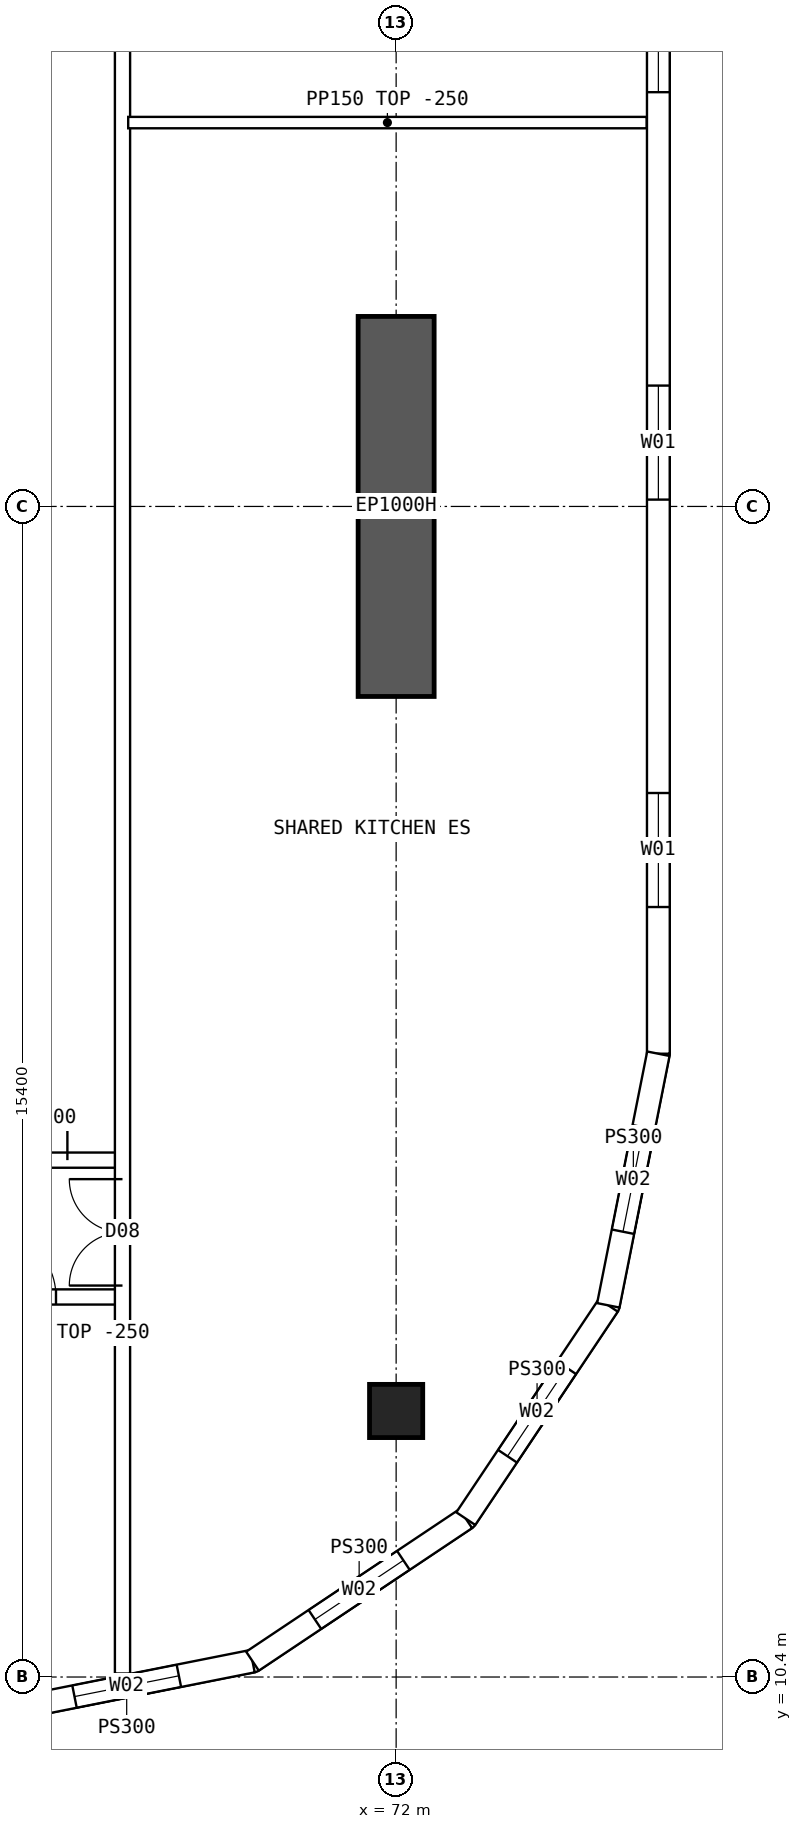
"""IFC4 building model, lengths in metres.
Left out: names, types, materials, properties, quantities, classifications, styles, units other than length and angle.
Written with IfcOpenShell. Run it as: python <this file> out.ifc"""

import sys

from ifc_helpers import new_model, si_unit, direction, frame, frame_2d, origin, origin_2d, place, context, subcontext, project, spatial, polyline, rectangle, hollow_rectangle, outline, extrude, element, fill, save


model = new_model("IFC4")
c1 = context("Model", 3, precision=1e-05, world=origin(), true_north=direction((0.0, 1.0)))
c2 = subcontext(c1, "Body", "Model", "MODEL_VIEW")
j1 = project(units=[si_unit("LENGTHUNIT", "METRE"), si_unit("PLANEANGLEUNIT", "RADIAN")], contexts=[c1])
p1 = place(None, origin())
s1 = spatial("IfcSite", under=j1, at=p1, CompositionType="ELEMENT")
p2 = place(p1, origin())
s2 = spatial("IfcBuilding", under=s1, at=p2, CompositionType="ELEMENT")
p3 = place(p2, frame((0.0, 0.0, 193.6)))
s3 = spatial("IfcBuildingStorey", under=s2, at=p3, CompositionType="ELEMENT", Elevation=193.6)
p4 = place(p3, frame((72.0, 13.9, 0.0), z_axis=(0.0, 0.0, 1.0), x_axis=(1.0, 0.0, 0.0)))
e1 = element("IfcColumn", 1, at=p4, inside=s3, PredefinedType="COLUMN", context=c2, shape_type="SweptSolid", body=[
    extrude(hollow_rectangle(XDim=0.7, YDim=0.7, WallThickness=0.07, at=origin_2d()), origin(), (0.0, 0.0, 1.0), 3.75),
])
p5 = place(p3, frame((72.0, 23.3, 0.0), z_axis=(0.0, 0.0, 1.0), x_axis=(0.0, 1.0, 0.0)))
e2 = element("IfcWall", 2, at=p5, inside=s3, PredefinedType="SHEAR", context=c2, shape_type="SweptSolid", body=[
    extrude(rectangle(XDim=5.0, YDim=1.0, at=frame_2d((2.5, 0.0))), origin(), (0.0, 0.0, 1.0), 3.75),
])
p6 = place(p3, frame((75.45, 18.6, 0.0), z_axis=(0.0, 0.0, 1.0), x_axis=(0.0, 1.0, 0.0)))
e3 = element("IfcWall", 3, at=p6, inside=s3, PredefinedType="SOLIDWALL", context=c2, shape_type="SweptSolid", body=[
    extrude(outline(polyline([(-0.015, -0.15), (26.815, -0.15), (26.785, 0.15), (0.015, 0.15), (-0.015, -0.15)])), origin(), (0.0, 0.0, 1.0), 3.5),
])
p7 = place(p6, frame((1.93, 0.0, 0.9)))
e4 = element("IfcOpeningElement", 4, at=p7, cuts=e3, PredefinedType="OPENING", context=c2, shape_type="SweptSolid", body=[
    extrude(rectangle(XDim=1.5, YDim=2.0, at=frame_2d((0.75, 1.0))), frame((0.0, 0.16, 0.0), z_axis=(0.0, -1.0, 0.0), x_axis=(1.0, 0.0, 0.0)), (0.0, 0.0, 1.0), 0.32),
])
p8 = place(p6, frame((7.29, 0.0, 0.9)))
e5 = element("IfcOpeningElement", 5, at=p8, cuts=e3, PredefinedType="OPENING", context=c2, shape_type="SweptSolid", body=[
    extrude(rectangle(XDim=1.5, YDim=2.0, at=frame_2d((0.75, 1.0))), frame((0.0, 0.16, 0.0), z_axis=(0.0, -1.0, 0.0), x_axis=(1.0, 0.0, 0.0)), (0.0, 0.0, 1.0), 0.32),
])
p9 = place(p6, frame((12.65, 0.0, 0.9)))
e6 = element("IfcOpeningElement", 6, at=p9, cuts=e3, PredefinedType="OPENING", context=c2, shape_type="SweptSolid", body=[
    extrude(rectangle(XDim=1.5, YDim=2.0, at=frame_2d((0.75, 1.0))), frame((0.0, 0.16, 0.0), z_axis=(0.0, -1.0, 0.0), x_axis=(1.0, 0.0, 0.0)), (0.0, 0.0, 1.0), 0.32),
])
p10 = place(p6, frame((18.01, 0.0, 0.9)))
e7 = element("IfcOpeningElement", 7, at=p10, cuts=e3, PredefinedType="OPENING", context=c2, shape_type="SweptSolid", body=[
    extrude(rectangle(XDim=1.5, YDim=2.0, at=frame_2d((0.75, 1.0))), frame((0.0, 0.16, 0.0), z_axis=(0.0, -1.0, 0.0), x_axis=(1.0, 0.0, 0.0)), (0.0, 0.0, 1.0), 0.32),
])
p11 = place(p6, frame((23.37, 0.0, 0.9)))
e8 = element("IfcOpeningElement", 8, at=p11, cuts=e3, PredefinedType="OPENING", context=c2, shape_type="SweptSolid", body=[
    extrude(rectangle(XDim=1.5, YDim=2.0, at=frame_2d((0.75, 1.0))), frame((0.0, 0.16, 0.0), z_axis=(0.0, -1.0, 0.0), x_axis=(1.0, 0.0, 0.0)), (0.0, 0.0, 1.0), 0.32),
])
p12 = place(p3, frame((66.8, 9.95, 0.0), z_axis=(0.0, 0.0, 1.0), x_axis=(0.98078325777, 0.195100490205, 0.0)))
e9 = element("IfcWall", 9, at=p12, inside=s3, PredefinedType="SOLIDWALL", context=c2, shape_type="SweptSolid", body=[
    extrude(outline(polyline([(-0.03, -0.15), (3.405, -0.15), (3.345, 0.15), (0.03, 0.15), (-0.03, -0.15)])), origin(), (0.0, 0.0, 1.0), 3.5),
])
p13 = place(p12, frame((0.988, 0.0, 0.9)))
e10 = element("IfcOpeningElement", 10, at=p13, cuts=e9, PredefinedType="OPENING", context=c2, shape_type="SweptSolid", body=[
    extrude(rectangle(XDim=1.4, YDim=1.8, at=frame_2d((0.7, 0.9))), frame((0.0, 0.16, 0.0), z_axis=(0.0, -1.0, 0.0), x_axis=(1.0, 0.0, 0.0)), (0.0, 0.0, 1.0), 0.32),
])
p14 = place(p3, frame((70.11, 10.608, 0.0), z_axis=(0.0, 0.0, 1.0), x_axis=(0.831493450887, 0.555534554399, 0.0)))
e11 = element("IfcWall", 11, at=p14, inside=s3, PredefinedType="SOLIDWALL", context=c2, shape_type="SweptSolid", body=[
    extrude(outline(polyline([(-0.03, -0.15), (3.405, -0.15), (3.345, 0.15), (0.03, 0.15), (-0.03, -0.15)])), origin(), (0.0, 0.0, 1.0), 3.5),
])
p15 = place(p14, frame((0.988, 0.0, 0.9)))
e12 = element("IfcOpeningElement", 12, at=p15, cuts=e11, PredefinedType="OPENING", context=c2, shape_type="SweptSolid", body=[
    extrude(rectangle(XDim=1.4, YDim=1.8, at=frame_2d((0.7, 0.9))), frame((0.0, 0.16, 0.0), z_axis=(0.0, -1.0, 0.0), x_axis=(1.0, 0.0, 0.0)), (0.0, 0.0, 1.0), 0.32),
])
p16 = place(p3, frame((72.917, 12.483, 0.0), z_axis=(0.0, 0.0, 1.0), x_axis=(0.555534554399, 0.831493450887, 0.0)))
e13 = element("IfcWall", 13, at=p16, inside=s3, PredefinedType="SOLIDWALL", context=c2, shape_type="SweptSolid", body=[
    extrude(outline(polyline([(-0.03, -0.15), (3.405, -0.15), (3.345, 0.15), (0.03, 0.15), (-0.03, -0.15)])), origin(), (0.0, 0.0, 1.0), 3.5),
])
p17 = place(p16, frame((0.988, 0.0, 0.9)))
e14 = element("IfcOpeningElement", 14, at=p17, cuts=e13, PredefinedType="OPENING", context=c2, shape_type="SweptSolid", body=[
    extrude(rectangle(XDim=1.4, YDim=1.8, at=frame_2d((0.7, 0.9))), frame((0.0, 0.16, 0.0), z_axis=(0.0, -1.0, 0.0), x_axis=(1.0, 0.0, 0.0)), (0.0, 0.0, 1.0), 0.32),
])
p18 = place(p3, frame((74.792, 15.29, 0.0), z_axis=(0.0, 0.0, 1.0), x_axis=(0.19508664885, 0.980786011034, 0.0)))
e15 = element("IfcWall", 15, at=p18, inside=s3, PredefinedType="SOLIDWALL", context=c2, shape_type="SweptSolid", body=[
    extrude(outline(polyline([(-0.03, -0.15), (3.39, -0.15), (3.36, 0.15), (0.03, 0.15), (-0.03, -0.15)])), origin(), (0.0, 0.0, 1.0), 3.5),
])
p19 = place(p18, frame((0.988, 0.0, 0.9)))
e16 = element("IfcOpeningElement", 16, at=p19, cuts=e15, PredefinedType="OPENING", context=c2, shape_type="SweptSolid", body=[
    extrude(rectangle(XDim=1.4, YDim=1.8, at=frame_2d((0.7, 0.9))), frame((0.0, 0.16, 0.0), z_axis=(0.0, -1.0, 0.0), x_axis=(1.0, 0.0, 0.0)), (0.0, 0.0, 1.0), 0.32),
])
p20 = place(p3, frame((66.425, 15.4, 0.0), z_axis=(0.0, 0.0, 1.0), x_axis=(1.0, 0.0, 0.0)))
e17 = element("IfcWall", 17, at=p20, inside=s3, PredefinedType="SOLIDWALL", context=c2, shape_type="SweptSolid", body=[
    extrude(rectangle(XDim=1.975, YDim=0.2, at=frame_2d((0.987, 0.0))), origin(), (0.0, 0.0, 1.0), 3.5),
])
p21 = place(p20, frame((0.2, 0.0, 0.0)))
e18 = element("IfcOpeningElement", 18, at=p21, cuts=e17, PredefinedType="OPENING", context=c2, shape_type="SweptSolid", body=[
    extrude(rectangle(XDim=0.9, YDim=2.1, at=frame_2d((0.45, 1.05))), frame((0.0, 0.11, 0.0), z_axis=(0.0, -1.0, 0.0), x_axis=(1.0, 0.0, 0.0)), (0.0, 0.0, 1.0), 0.22),
])
p22 = place(p3, frame((66.425, 17.2, 0.0), z_axis=(0.0, 0.0, 1.0), x_axis=(1.0, 0.0, 0.0)))
e19 = element("IfcWall", 19, at=p22, inside=s3, PredefinedType="SOLIDWALL", context=c2, shape_type="SweptSolid", body=[
    extrude(rectangle(XDim=1.975, YDim=0.2, at=frame_2d((0.987, 0.0))), origin(), (0.0, 0.0, 1.0), 3.5),
])
p23 = place(p22, frame((0.05, 0.0, 0.0)))
e20 = element("IfcOpeningElement", 20, at=p23, cuts=e19, PredefinedType="OPENING", context=c2, shape_type="SweptSolid", body=[
    extrude(rectangle(XDim=1.2, YDim=2.1, at=frame_2d((0.6, 1.05))), frame((0.0, 0.11, 0.0), z_axis=(0.0, -1.0, 0.0), x_axis=(1.0, 0.0, 0.0)), (0.0, 0.0, 1.0), 0.22),
])
p24 = place(p3, frame((68.475, 30.85, 0.0), z_axis=(0.0, 0.0, 1.0), x_axis=(1.0, 0.0, 0.0)))
e21 = element("IfcWall", 21, at=p24, inside=s3, PredefinedType="PARTITIONING", context=c2, shape_type="SweptSolid", body=[
    extrude(outline(polyline([(0.0, 0.0), (6.82, 0.0), (6.82, 3.5), (3.827, 3.5), (3.825, 3.05), (3.227, 3.05), (3.225, 3.5), (0.0, 3.5), (0.0, 0.0)])), frame((0.0, 0.075, 0.0), z_axis=(0.0, -1.0, 0.0), x_axis=(1.0, 0.0, 0.0)), (0.0, 0.0, 1.0), 0.15),
])
p25 = place(p3, frame((68.4, 10.446, 0.0), z_axis=(0.0, 0.0, 1.0), x_axis=(0.0, 1.0, 0.0)))
e22 = element("IfcWall", 22, at=p25, inside=s3, PredefinedType="SOLIDWALL", context=c2, shape_type="SweptSolid", body=[
    extrude(rectangle(XDim=43.107, YDim=0.2, at=frame_2d((21.554, 0.0))), origin(), (0.0, 0.0, 1.0), 3.5),
])
p26 = place(p25, frame((27.994, 0.0, 0.0)))
e23 = element("IfcOpeningElement", 23, at=p26, cuts=e22, PredefinedType="OPENING", context=c2, shape_type="SweptSolid", body=[
    extrude(rectangle(XDim=1.2, YDim=2.1, at=frame_2d((0.6, 1.05))), frame((0.0, 0.11, 0.0), z_axis=(0.0, -1.0, 0.0), x_axis=(1.0, 0.0, 0.0)), (0.0, 0.0, 1.0), 0.22),
])
p27 = place(p25, frame((5.104, 0.0, 0.0)))
e24 = element("IfcOpeningElement", 24, at=p27, cuts=e22, PredefinedType="OPENING", context=c2, shape_type="SweptSolid", body=[
    extrude(rectangle(XDim=1.4, YDim=2.1, at=frame_2d((0.7, 1.05))), frame((0.0, 0.11, 0.0), z_axis=(0.0, -1.0, 0.0), x_axis=(1.0, 0.0, 0.0)), (0.0, 0.0, 1.0), 0.22),
])
p28 = place(p25, frame((36.504, 0.0, 0.0)))
e25 = element("IfcOpeningElement", 25, at=p28, cuts=e22, PredefinedType="OPENING", context=c2, shape_type="SweptSolid", body=[
    extrude(rectangle(XDim=1.4, YDim=2.1, at=frame_2d((0.7, 1.05))), frame((0.0, 0.11, 0.0), z_axis=(0.0, -1.0, 0.0), x_axis=(1.0, 0.0, 0.0)), (0.0, 0.0, 1.0), 0.22),
])
p29 = place(p7, origin())
e26 = element("IfcWindow", 26, at=p29, inside=s3, PartitioningType="SINGLE_PANEL", PredefinedType="WINDOW", context=c2, shape_type="SweptSolid", body=[
    extrude(rectangle(XDim=1.5, YDim=2.0, at=frame_2d((0.75, 1.0))), frame((0.0, 0.03, 0.0), z_axis=(0.0, -1.0, 0.0), x_axis=(1.0, 0.0, 0.0)), (0.0, 0.0, 1.0), 0.06),
])
fill(e4, e26)
p30 = place(p8, origin())
e27 = element("IfcWindow", 27, at=p30, inside=s3, PartitioningType="SINGLE_PANEL", PredefinedType="WINDOW", context=c2, shape_type="SweptSolid", body=[
    extrude(rectangle(XDim=1.5, YDim=2.0, at=frame_2d((0.75, 1.0))), frame((0.0, 0.03, 0.0), z_axis=(0.0, -1.0, 0.0), x_axis=(1.0, 0.0, 0.0)), (0.0, 0.0, 1.0), 0.06),
])
fill(e5, e27)
p31 = place(p9, origin())
e28 = element("IfcWindow", 28, at=p31, inside=s3, PartitioningType="SINGLE_PANEL", PredefinedType="WINDOW", context=c2, shape_type="SweptSolid", body=[
    extrude(rectangle(XDim=1.5, YDim=2.0, at=frame_2d((0.75, 1.0))), frame((0.0, 0.03, 0.0), z_axis=(0.0, -1.0, 0.0), x_axis=(1.0, 0.0, 0.0)), (0.0, 0.0, 1.0), 0.06),
])
fill(e6, e28)
p32 = place(p13, origin())
e29 = element("IfcWindow", 29, at=p32, inside=s3, PartitioningType="SINGLE_PANEL", PredefinedType="WINDOW", context=c2, shape_type="SweptSolid", body=[
    extrude(rectangle(XDim=1.4, YDim=1.8, at=frame_2d((0.7, 0.9))), frame((0.0, 0.03, 0.0), z_axis=(0.0, -1.0, 0.0), x_axis=(1.0, 0.0, 0.0)), (0.0, 0.0, 1.0), 0.06),
])
fill(e10, e29)
p33 = place(p15, origin())
e30 = element("IfcWindow", 30, at=p33, inside=s3, PartitioningType="SINGLE_PANEL", PredefinedType="WINDOW", context=c2, shape_type="SweptSolid", body=[
    extrude(rectangle(XDim=1.4, YDim=1.8, at=frame_2d((0.7, 0.9))), frame((0.0, 0.03, 0.0), z_axis=(0.0, -1.0, 0.0), x_axis=(1.0, 0.0, 0.0)), (0.0, 0.0, 1.0), 0.06),
])
fill(e12, e30)
p34 = place(p17, origin())
e31 = element("IfcWindow", 31, at=p34, inside=s3, PartitioningType="SINGLE_PANEL", PredefinedType="WINDOW", context=c2, shape_type="SweptSolid", body=[
    extrude(rectangle(XDim=1.4, YDim=1.8, at=frame_2d((0.7, 0.9))), frame((0.0, 0.03, 0.0), z_axis=(0.0, -1.0, 0.0), x_axis=(1.0, 0.0, 0.0)), (0.0, 0.0, 1.0), 0.06),
])
fill(e14, e31)
p35 = place(p19, origin())
e32 = element("IfcWindow", 32, at=p35, inside=s3, PartitioningType="SINGLE_PANEL", PredefinedType="WINDOW", context=c2, shape_type="SweptSolid", body=[
    extrude(rectangle(XDim=1.4, YDim=1.8, at=frame_2d((0.7, 0.9))), frame((0.0, 0.03, 0.0), z_axis=(0.0, -1.0, 0.0), x_axis=(1.0, 0.0, 0.0)), (0.0, 0.0, 1.0), 0.06),
])
fill(e16, e32)
p36 = place(p23, origin())
e33 = element("IfcDoor", 33, at=p36, inside=s3, OperationType="DOUBLE_DOOR_SINGLE_SWING", PredefinedType="DOOR", context=c2, shape_type="SweptSolid", body=[
    extrude(rectangle(XDim=1.2, YDim=2.1, at=frame_2d((0.6, 1.05))), frame((0.0, 0.025, 0.0), z_axis=(0.0, -1.0, 0.0), x_axis=(1.0, 0.0, 0.0)), (0.0, 0.0, 1.0), 0.05),
])
fill(e20, e33)
p37 = place(p27, origin())
e34 = element("IfcDoor", 34, at=p37, inside=s3, OperationType="DOUBLE_DOOR_SINGLE_SWING", PredefinedType="DOOR", context=c2, shape_type="SweptSolid", body=[
    extrude(rectangle(XDim=1.4, YDim=2.1, at=frame_2d((0.7, 1.05))), frame((0.0, 0.025, 0.0), z_axis=(0.0, -1.0, 0.0), x_axis=(1.0, 0.0, 0.0)), (0.0, 0.0, 1.0), 0.05),
])
fill(e24, e34)
p38 = place(p21, origin())
e35 = element("IfcDoor", 35, at=p38, inside=s3, OperationType="SINGLE_SWING_LEFT", PredefinedType="DOOR", context=c2, shape_type="SweptSolid", body=[
    extrude(rectangle(XDim=0.9, YDim=2.1, at=frame_2d((0.45, 1.05))), frame((0.0, 0.025, 0.0), z_axis=(0.0, -1.0, 0.0), x_axis=(1.0, 0.0, 0.0)), (0.0, 0.0, 1.0), 0.05),
])
fill(e18, e35)
save(model, sys.argv[1])
